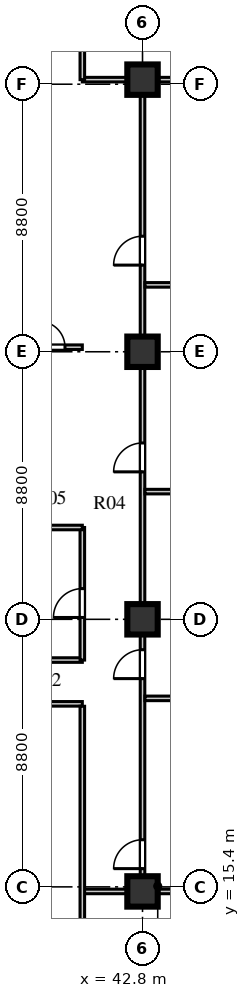
"""IFC4 building model, lengths in metres.
Left out: names, types, materials, properties, quantities, classifications, styles, units other than length and angle.
Written with IfcOpenShell. Run it as: python <this file> out.ifc"""

import sys

from ifc_helpers import new_model, si_unit, direction, frame, frame_2d, origin, origin_2d, place, context, subcontext, project, spatial, rectangle, extrude, element, fill, save


model = new_model("IFC4")
c1 = context("Model", 3, precision=1e-05, world=origin(), true_north=direction((0.0, 1.0)))
c2 = subcontext(c1, "Body", "Model", "MODEL_VIEW")
j1 = project(units=[si_unit("LENGTHUNIT", "METRE"), si_unit("PLANEANGLEUNIT", "RADIAN")], contexts=[c1])
p1 = place(None, origin())
s1 = spatial("IfcSite", under=j1, at=p1, CompositionType="ELEMENT")
p2 = place(p1, origin())
s2 = spatial("IfcBuilding", under=s1, at=p2, CompositionType="ELEMENT")
p3 = place(p2, frame((0.0, 0.0, 134.8)))
s3 = spatial("IfcBuildingStorey", under=s2, at=p3, CompositionType="ELEMENT", Elevation=134.8)
for number, where, z_axis, x_axis in (
    (1, (42.8, 15.25, 0.0), (0.0, 0.0, 1.0), (1.0, 0.0, 0.0)),
    (2, (42.8, 24.2, 0.0), (0.0, 0.0, 1.0), (1.0, 0.0, 0.0)),
    (3, (42.8, 33.0, 0.0), (0.0, 0.0, 1.0), (1.0, 0.0, 0.0)),
    (4, (42.8, 41.95, 0.0), (0.0, 0.0, 1.0), (1.0, 0.0, 0.0)),
):
    element("IfcColumn", number, at=place(p3, frame(where, z_axis=z_axis, x_axis=x_axis)), inside=s3, PredefinedType="COLUMN", context=c2, shape_type="SweptSolid", body=[
        extrude(rectangle(XDim=1.0, YDim=1.0, at=origin_2d()), origin(), (0.0, 0.0, 1.0), 3.6),
    ])
p4 = place(p3, frame((25.22, 21.42, 0.0), z_axis=(0.0, 0.0, 1.0), x_axis=(1.0, 0.0, 0.0)))
e5 = element("IfcWall", 5, at=p4, inside=s3, PredefinedType="PARTITIONING", context=c2, shape_type="SweptSolid", body=[
    extrude(rectangle(XDim=15.6, YDim=0.15, at=frame_2d((7.8, 0.0))), origin(), (0.0, 0.0, 1.0), 3.2),
])
p5 = place(p4, frame((0.73, 0.0, 0.0)))
e6 = element("IfcOpeningElement", 6, at=p5, cuts=e5, PredefinedType="OPENING", context=c2, shape_type="SweptSolid", body=[
    extrude(rectangle(XDim=0.95, YDim=2.1, at=frame_2d((0.475, 1.05))), frame((0.0, 0.085, 0.0), z_axis=(0.0, -1.0, 0.0), x_axis=(1.0, 0.0, 0.0)), (0.0, 0.0, 1.0), 0.17),
])
p6 = place(p4, frame((5.23, 0.0, 0.0)))
e7 = element("IfcOpeningElement", 7, at=p6, cuts=e5, PredefinedType="OPENING", context=c2, shape_type="SweptSolid", body=[
    extrude(rectangle(XDim=0.95, YDim=2.1, at=frame_2d((0.475, 1.05))), frame((0.0, 0.085, 0.0), z_axis=(0.0, -1.0, 0.0), x_axis=(1.0, 0.0, 0.0)), (0.0, 0.0, 1.0), 0.17),
])
p7 = place(p4, frame((10.83, 0.0, 0.0)))
e8 = element("IfcOpeningElement", 8, at=p7, cuts=e5, PredefinedType="OPENING", context=c2, shape_type="SweptSolid", body=[
    extrude(rectangle(XDim=0.95, YDim=2.1, at=frame_2d((0.475, 1.05))), frame((0.0, 0.085, 0.0), z_axis=(0.0, -1.0, 0.0), x_axis=(1.0, 0.0, 0.0)), (0.0, 0.0, 1.0), 0.17),
])
p8 = place(p3, frame((27.15, 22.86, 0.0), z_axis=(0.0, 0.0, 1.0), x_axis=(1.0, 0.0, 0.0)))
e9 = element("IfcWall", 9, at=p8, inside=s3, PredefinedType="PARTITIONING", context=c2, shape_type="SweptSolid", body=[
    extrude(rectangle(XDim=13.67, YDim=0.15, at=frame_2d((6.835, 0.0))), origin(), (0.0, 0.0, 1.0), 3.6),
])
p9 = place(p8, frame((2.2, 0.0, 0.0)))
e10 = element("IfcOpeningElement", 10, at=p9, cuts=e9, PredefinedType="OPENING", context=c2, shape_type="SweptSolid", body=[
    extrude(rectangle(XDim=0.9, YDim=2.08, at=frame_2d((0.45, 1.04))), frame((0.0, 0.085, 0.0), z_axis=(0.0, -1.0, 0.0), x_axis=(1.0, 0.0, 0.0)), (0.0, 0.0, 1.0), 0.17),
])
p10 = place(p3, frame((42.8, 15.25, 0.0), z_axis=(0.0, 0.0, 1.0), x_axis=(0.0, 1.0, 0.0)))
e11 = element("IfcWall", 11, at=p10, inside=s3, PredefinedType="PARTITIONING", context=c2, shape_type="SweptSolid", body=[
    extrude(rectangle(XDim=26.7, YDim=0.15, at=frame_2d((13.35, 0.0))), origin(), (0.0, 0.0, 1.0), 2.95),
])
p11 = place(p10, frame((0.75, 0.0, 0.0)))
e12 = element("IfcOpeningElement", 12, at=p11, cuts=e11, PredefinedType="OPENING", context=c2, shape_type="SweptSolid", body=[
    extrude(rectangle(XDim=0.95, YDim=2.1, at=frame_2d((0.475, 1.05))), frame((0.0, 0.085, 0.0), z_axis=(0.0, -1.0, 0.0), x_axis=(1.0, 0.0, 0.0)), (0.0, 0.0, 1.0), 0.17),
])
p12 = place(p10, frame((7.0, 0.0, 0.0)))
e13 = element("IfcOpeningElement", 13, at=p12, cuts=e11, PredefinedType="OPENING", context=c2, shape_type="SweptSolid", body=[
    extrude(rectangle(XDim=0.95, YDim=2.1, at=frame_2d((0.475, 1.05))), frame((0.0, 0.085, 0.0), z_axis=(0.0, -1.0, 0.0), x_axis=(1.0, 0.0, 0.0)), (0.0, 0.0, 1.0), 0.17),
])
p13 = place(p10, frame((13.8, 0.0, 0.0)))
e14 = element("IfcOpeningElement", 14, at=p13, cuts=e11, PredefinedType="OPENING", context=c2, shape_type="SweptSolid", body=[
    extrude(rectangle(XDim=0.95, YDim=2.1, at=frame_2d((0.475, 1.05))), frame((0.0, 0.085, 0.0), z_axis=(0.0, -1.0, 0.0), x_axis=(1.0, 0.0, 0.0)), (0.0, 0.0, 1.0), 0.17),
])
p14 = place(p10, frame((20.6, 0.0, 0.0)))
e15 = element("IfcOpeningElement", 15, at=p14, cuts=e11, PredefinedType="OPENING", context=c2, shape_type="SweptSolid", body=[
    extrude(rectangle(XDim=0.95, YDim=2.1, at=frame_2d((0.475, 1.05))), frame((0.0, 0.085, 0.0), z_axis=(0.0, -1.0, 0.0), x_axis=(1.0, 0.0, 0.0)), (0.0, 0.0, 1.0), 0.17),
])
for number, where, z_axis, x_axis in (
    (16, (40.82, 15.25, 0.0), (0.0, 0.0, 1.0), (1.0, 0.0, 0.0)),
    (17, (40.82, 41.95, 0.0), (0.0, 0.0, 1.0), (1.0, 0.0, 0.0)),
):
    element("IfcWall", number, at=place(p3, frame(where, z_axis=z_axis, x_axis=x_axis)), inside=s3, PredefinedType="PARTITIONING", context=c2, shape_type="SweptSolid", body=[
        extrude(rectangle(XDim=7.3, YDim=0.15, at=frame_2d((3.65, 0.0))), origin(), (0.0, 0.0, 1.0), 2.95),
    ])
p15 = place(p3, frame((40.82, 22.86, 0.0), z_axis=(0.0, 0.0, 1.0), x_axis=(0.0, 1.0, 0.0)))
e18 = element("IfcWall", 18, at=p15, inside=s3, PredefinedType="PARTITIONING", context=c2, shape_type="SweptSolid", body=[
    extrude(rectangle(XDim=4.36, YDim=0.15, at=frame_2d((2.18, 0.0))), origin(), (0.0, 0.0, 1.0), 3.6),
])
p16 = place(p15, frame((1.4, 0.0, 0.0)))
e19 = element("IfcOpeningElement", 19, at=p16, cuts=e18, PredefinedType="OPENING", context=c2, shape_type="SweptSolid", body=[
    extrude(rectangle(XDim=0.95, YDim=2.1, at=frame_2d((0.475, 1.05))), frame((0.0, 0.085, 0.0), z_axis=(0.0, -1.0, 0.0), x_axis=(1.0, 0.0, 0.0)), (0.0, 0.0, 1.0), 0.17),
])
p17 = place(p3, frame((36.9, 27.22, 0.0), z_axis=(0.0, 0.0, 1.0), x_axis=(1.0, 0.0, 0.0)))
e20 = element("IfcWall", 20, at=p17, inside=s3, PredefinedType="PARTITIONING", context=c2, shape_type="SweptSolid", body=[
    extrude(rectangle(XDim=3.92, YDim=0.15, at=frame_2d((1.96, 0.0))), origin(), (0.0, 0.0, 1.0), 3.2),
])
p18 = place(p3, frame((40.82, 10.28, 0.0), z_axis=(0.0, 0.0, 1.0), x_axis=(0.0, 1.0, 0.0)))
e21 = element("IfcWall", 21, at=p18, inside=s3, PredefinedType="PARTITIONING", context=c2, shape_type="SweptSolid", body=[
    extrude(rectangle(XDim=11.06, YDim=0.15, at=frame_2d((5.53, 0.0))), origin(), (0.0, 0.0, 1.0), 3.6),
])
for number, where, z_axis, x_axis in (
    (22, (42.88, 21.6, 0.0), (0.0, 0.0, 1.0), (1.0, 0.0, 0.0)),
    (23, (42.88, 28.4, 0.0), (0.0, 0.0, 1.0), (1.0, 0.0, 0.0)),
    (24, (42.88, 35.2, 0.0), (0.0, 0.0, 1.0), (1.0, 0.0, 0.0)),
):
    element("IfcWall", number, at=place(p3, frame(where, z_axis=z_axis, x_axis=x_axis)), inside=s3, PredefinedType="PARTITIONING", context=c2, shape_type="SweptSolid", body=[
        extrude(rectangle(XDim=5.24, YDim=0.15, at=frame_2d((2.62, 0.0))), origin(), (0.0, 0.0, 1.0), 3.6),
    ])
p19 = place(p3, frame((38.95, 33.15, 0.0), z_axis=(0.0, 0.0, 1.0), x_axis=(1.0, 0.0, 0.0)))
e25 = element("IfcWall", 25, at=p19, inside=s3, PredefinedType="PARTITIONING", context=c2, shape_type="SweptSolid", body=[
    extrude(rectangle(XDim=1.87, YDim=0.15, at=frame_2d((0.935, 0.0))), origin(), (0.0, 0.0, 1.0), 3.6),
])
p20 = place(p19, frame((0.45, 0.0, 0.0)))
e26 = element("IfcOpeningElement", 26, at=p20, cuts=e25, PredefinedType="OPENING", context=c2, shape_type="SweptSolid", body=[
    extrude(rectangle(XDim=0.85, YDim=2.05, at=frame_2d((0.425, 1.025))), frame((0.0, 0.085, 0.0), z_axis=(0.0, -1.0, 0.0), x_axis=(1.0, 0.0, 0.0)), (0.0, 0.0, 1.0), 0.17),
])
p21 = place(p3, frame((40.82, 41.95, 0.0), z_axis=(0.0, 0.0, 1.0), x_axis=(0.0, 1.0, 0.0)))
e27 = element("IfcWall", 27, at=p21, inside=s3, PredefinedType="PARTITIONING", context=c2, shape_type="SweptSolid", body=[
    extrude(rectangle(XDim=4.97, YDim=0.15, at=frame_2d((2.485, 0.0))), origin(), (0.0, 0.0, 1.0), 3.6),
])
p22 = place(p16, frame((0.95, 0.0, 0.0), z_axis=(0.0, 0.0, 1.0), x_axis=(-1.0, 0.0, 0.0)))
e28 = element("IfcDoor", 28, at=p22, inside=s3, OperationType="SINGLE_SWING_RIGHT", PredefinedType="DOOR", context=c2, shape_type="SweptSolid", body=[
    extrude(rectangle(XDim=0.95, YDim=2.1, at=frame_2d((0.475, 1.05))), frame((0.0, 0.025, 0.0), z_axis=(0.0, -1.0, 0.0), x_axis=(1.0, 0.0, 0.0)), (0.0, 0.0, 1.0), 0.05),
])
fill(e19, e28)
p23 = place(p11, origin())
e29 = element("IfcDoor", 29, at=p23, inside=s3, OperationType="SINGLE_SWING_LEFT", PredefinedType="DOOR", context=c2, shape_type="SweptSolid", body=[
    extrude(rectangle(XDim=0.95, YDim=2.1, at=frame_2d((0.475, 1.05))), frame((0.0, 0.025, 0.0), z_axis=(0.0, -1.0, 0.0), x_axis=(1.0, 0.0, 0.0)), (0.0, 0.0, 1.0), 0.05),
])
fill(e12, e29)
p24 = place(p12, origin())
e30 = element("IfcDoor", 30, at=p24, inside=s3, OperationType="SINGLE_SWING_LEFT", PredefinedType="DOOR", context=c2, shape_type="SweptSolid", body=[
    extrude(rectangle(XDim=0.95, YDim=2.1, at=frame_2d((0.475, 1.05))), frame((0.0, 0.025, 0.0), z_axis=(0.0, -1.0, 0.0), x_axis=(1.0, 0.0, 0.0)), (0.0, 0.0, 1.0), 0.05),
])
fill(e13, e30)
p25 = place(p13, origin())
e31 = element("IfcDoor", 31, at=p25, inside=s3, OperationType="SINGLE_SWING_LEFT", PredefinedType="DOOR", context=c2, shape_type="SweptSolid", body=[
    extrude(rectangle(XDim=0.95, YDim=2.1, at=frame_2d((0.475, 1.05))), frame((0.0, 0.025, 0.0), z_axis=(0.0, -1.0, 0.0), x_axis=(1.0, 0.0, 0.0)), (0.0, 0.0, 1.0), 0.05),
])
fill(e14, e31)
p26 = place(p14, origin())
e32 = element("IfcDoor", 32, at=p26, inside=s3, OperationType="SINGLE_SWING_LEFT", PredefinedType="DOOR", context=c2, shape_type="SweptSolid", body=[
    extrude(rectangle(XDim=0.95, YDim=2.1, at=frame_2d((0.475, 1.05))), frame((0.0, 0.025, 0.0), z_axis=(0.0, -1.0, 0.0), x_axis=(1.0, 0.0, 0.0)), (0.0, 0.0, 1.0), 0.05),
])
fill(e15, e32)
p27 = place(p20, origin())
e33 = element("IfcDoor", 33, at=p27, inside=s3, OperationType="SINGLE_SWING_LEFT", PredefinedType="DOOR", context=c2, shape_type="SweptSolid", body=[
    extrude(rectangle(XDim=0.85, YDim=2.05, at=frame_2d((0.425, 1.025))), frame((0.0, 0.025, 0.0), z_axis=(0.0, -1.0, 0.0), x_axis=(1.0, 0.0, 0.0)), (0.0, 0.0, 1.0), 0.05),
])
fill(e26, e33)
save(model, sys.argv[1])
